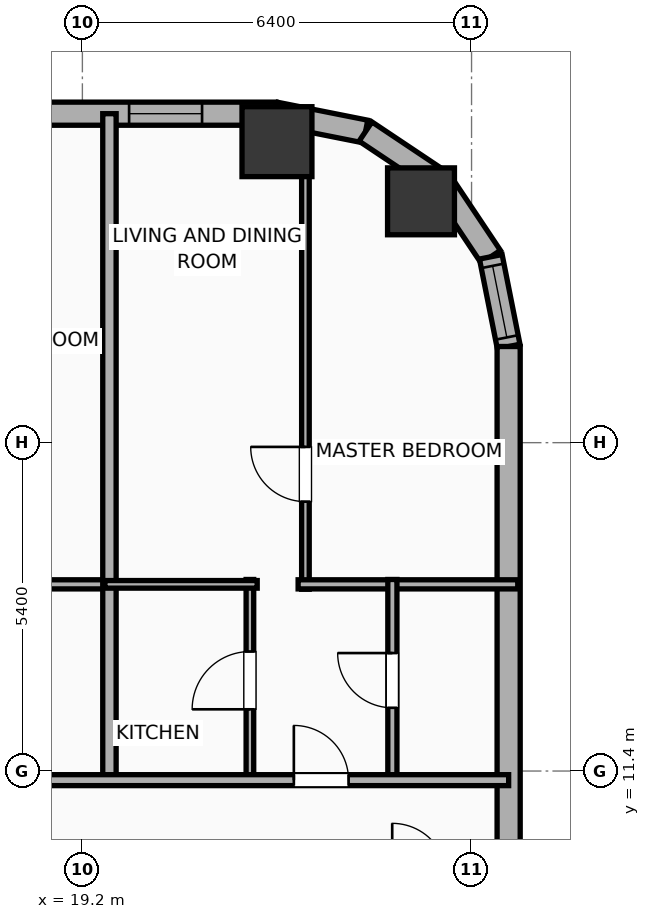
"""IFC4 building model, lengths in metres.
Left out: names, types, materials, properties, quantities, classifications, styles, units other than length and angle.
Written with IfcOpenShell. Run it as: python <this file> out.ifc"""

import sys

from ifc_helpers import new_model, si_unit, direction, frame, frame_2d, origin, origin_2d, place, context, subcontext, project, spatial, rectangle, hollow_rectangle, hollow_circle, extrude, element, fill, save


model = new_model("IFC4")
c1 = context("Model", 3, precision=1e-05, world=origin(), true_north=direction((0.0, 1.0)))
c2 = subcontext(c1, "Body", "Model", "MODEL_VIEW")
j1 = project(units=[si_unit("LENGTHUNIT", "METRE"), si_unit("PLANEANGLEUNIT", "RADIAN")], contexts=[c1])
p1 = place(None, origin())
s1 = spatial("IfcSite", under=j1, at=p1, CompositionType="ELEMENT")
p2 = place(p1, origin())
s2 = spatial("IfcBuilding", under=s1, at=p2, CompositionType="ELEMENT")
p3 = place(p2, frame((0.0, 0.0, 76.7)))
s3 = spatial("IfcBuildingStorey", under=s2, at=p3, CompositionType="ELEMENT", Elevation=76.7)
p4 = place(p3, frame((24.769, 20.769, 0.0), z_axis=(0.0, 0.0, 1.0), x_axis=(1.0, 0.0, 0.0)))
e1 = element("IfcColumn", 1, at=p4, inside=s3, PredefinedType="COLUMN", context=c2, shape_type="SweptSolid", body=[
    extrude(hollow_circle(Radius=0.55, WallThickness=0.036, at=origin_2d()), origin(), (0.0, 0.0, 1.0), 3.9),
])
p5 = place(p3, frame((22.4, 21.75, 0.0), z_axis=(0.0, 0.0, 1.0), x_axis=(1.0, 0.0, 0.0)))
e2 = element("IfcColumn", 2, at=p5, inside=s3, PredefinedType="COLUMN", context=c2, shape_type="SweptSolid", body=[
    extrude(hollow_rectangle(XDim=1.15, YDim=1.15, WallThickness=0.04, at=origin_2d()), origin(), (0.0, 0.0, 1.0), 3.9),
])
p6 = place(p3, frame((-29.581, 22.21, 0.0), z_axis=(0.0, 0.0, 1.0), x_axis=(1.0, 0.0, 0.0)))
e3 = element("IfcWall", 3, at=p6, inside=s3, PredefinedType="ELEMENTEDWALL", context=c2, shape_type="SweptSolid", body=[
    extrude(rectangle(XDim=51.963, YDim=0.38, at=frame_2d((25.981, 0.0))), origin(), (0.0, 0.0, 1.0), 3.6),
])
p7 = place(p6, frame((25.631, 0.0, 0.75)))
e4 = element("IfcOpeningElement", 4, at=p7, cuts=e3, PredefinedType="OPENING", context=c2, shape_type="SweptSolid", body=[
    extrude(rectangle(XDim=2.4, YDim=2.1, at=frame_2d((1.2, 1.05))), frame((0.0, 0.2, 0.0), z_axis=(0.0, -1.0, 0.0), x_axis=(1.0, 0.0, 0.0)), (0.0, 0.0, 1.0), 0.4),
])
p8 = place(p6, frame((42.952, 0.0, 0.75)))
e5 = element("IfcOpeningElement", 5, at=p8, cuts=e3, PredefinedType="OPENING", context=c2, shape_type="SweptSolid", body=[
    extrude(rectangle(XDim=2.4, YDim=2.1, at=frame_2d((1.2, 1.05))), frame((0.0, 0.2, 0.0), z_axis=(0.0, -1.0, 0.0), x_axis=(1.0, 0.0, 0.0)), (0.0, 0.0, 1.0), 0.4),
])
p9 = place(p6, frame((1.406, 0.0, 0.75)))
e6 = element("IfcOpeningElement", 6, at=p9, cuts=e3, PredefinedType="OPENING", context=c2, shape_type="SweptSolid", body=[
    extrude(rectangle(XDim=1.2, YDim=2.05, at=frame_2d((0.6, 1.025))), frame((0.0, 0.2, 0.0), z_axis=(0.0, -1.0, 0.0), x_axis=(1.0, 0.0, 0.0)), (0.0, 0.0, 1.0), 0.4),
])
p10 = place(p6, frame((4.297, 0.0, 0.75)))
e7 = element("IfcOpeningElement", 7, at=p10, cuts=e3, PredefinedType="OPENING", context=c2, shape_type="SweptSolid", body=[
    extrude(rectangle(XDim=1.2, YDim=2.05, at=frame_2d((0.6, 1.025))), frame((0.0, 0.2, 0.0), z_axis=(0.0, -1.0, 0.0), x_axis=(1.0, 0.0, 0.0)), (0.0, 0.0, 1.0), 0.4),
])
p11 = place(p6, frame((7.776, 0.0, 0.75)))
e8 = element("IfcOpeningElement", 8, at=p11, cuts=e3, PredefinedType="OPENING", context=c2, shape_type="SweptSolid", body=[
    extrude(rectangle(XDim=1.2, YDim=2.05, at=frame_2d((0.6, 1.025))), frame((0.0, 0.2, 0.0), z_axis=(0.0, -1.0, 0.0), x_axis=(1.0, 0.0, 0.0)), (0.0, 0.0, 1.0), 0.4),
])
p12 = place(p6, frame((14.036, 0.0, 0.75)))
e9 = element("IfcOpeningElement", 9, at=p12, cuts=e3, PredefinedType="OPENING", context=c2, shape_type="SweptSolid", body=[
    extrude(rectangle(XDim=1.2, YDim=2.05, at=frame_2d((0.6, 1.025))), frame((0.0, 0.2, 0.0), z_axis=(0.0, -1.0, 0.0), x_axis=(1.0, 0.0, 0.0)), (0.0, 0.0, 1.0), 0.4),
])
p13 = place(p6, frame((11.146, 0.0, 0.75)))
e10 = element("IfcOpeningElement", 10, at=p13, cuts=e3, PredefinedType="OPENING", context=c2, shape_type="SweptSolid", body=[
    extrude(rectangle(XDim=1.2, YDim=2.05, at=frame_2d((0.6, 1.025))), frame((0.0, 0.2, 0.0), z_axis=(0.0, -1.0, 0.0), x_axis=(1.0, 0.0, 0.0)), (0.0, 0.0, 1.0), 0.4),
])
p14 = place(p6, frame((18.751, 0.0, 0.75)))
e11 = element("IfcOpeningElement", 11, at=p14, cuts=e3, PredefinedType="OPENING", context=c2, shape_type="SweptSolid", body=[
    extrude(rectangle(XDim=1.2, YDim=2.05, at=frame_2d((0.6, 1.025))), frame((0.0, 0.2, 0.0), z_axis=(0.0, -1.0, 0.0), x_axis=(1.0, 0.0, 0.0)), (0.0, 0.0, 1.0), 0.4),
])
p15 = place(p6, frame((23.647, 0.0, 0.75)))
e12 = element("IfcOpeningElement", 12, at=p15, cuts=e3, PredefinedType="OPENING", context=c2, shape_type="SweptSolid", body=[
    extrude(rectangle(XDim=1.2, YDim=2.05, at=frame_2d((0.6, 1.025))), frame((0.0, 0.2, 0.0), z_axis=(0.0, -1.0, 0.0), x_axis=(1.0, 0.0, 0.0)), (0.0, 0.0, 1.0), 0.4),
])
p16 = place(p6, frame((32.006, 0.0, 0.75)))
e13 = element("IfcOpeningElement", 13, at=p16, cuts=e3, PredefinedType="OPENING", context=c2, shape_type="SweptSolid", body=[
    extrude(rectangle(XDim=1.2, YDim=2.05, at=frame_2d((0.6, 1.025))), frame((0.0, 0.2, 0.0), z_axis=(0.0, -1.0, 0.0), x_axis=(1.0, 0.0, 0.0)), (0.0, 0.0, 1.0), 0.4),
])
p17 = place(p6, frame((34.176, 0.0, 0.75)))
e14 = element("IfcOpeningElement", 14, at=p17, cuts=e3, PredefinedType="OPENING", context=c2, shape_type="SweptSolid", body=[
    extrude(rectangle(XDim=1.2, YDim=2.05, at=frame_2d((0.6, 1.025))), frame((0.0, 0.2, 0.0), z_axis=(0.0, -1.0, 0.0), x_axis=(1.0, 0.0, 0.0)), (0.0, 0.0, 1.0), 0.4),
])
p18 = place(p6, frame((37.063, 0.0, 0.75)))
e15 = element("IfcOpeningElement", 15, at=p18, cuts=e3, PredefinedType="OPENING", context=c2, shape_type="SweptSolid", body=[
    extrude(rectangle(XDim=1.2, YDim=2.05, at=frame_2d((0.6, 1.025))), frame((0.0, 0.2, 0.0), z_axis=(0.0, -1.0, 0.0), x_axis=(1.0, 0.0, 0.0)), (0.0, 0.0, 1.0), 0.4),
])
p19 = place(p6, frame((39.509, 0.0, 0.75)))
e16 = element("IfcOpeningElement", 16, at=p19, cuts=e3, PredefinedType="OPENING", context=c2, shape_type="SweptSolid", body=[
    extrude(rectangle(XDim=1.2, YDim=2.05, at=frame_2d((0.6, 1.025))), frame((0.0, 0.2, 0.0), z_axis=(0.0, -1.0, 0.0), x_axis=(1.0, 0.0, 0.0)), (0.0, 0.0, 1.0), 0.4),
])
p20 = place(p6, frame((46.921, 0.0, 0.75)))
e17 = element("IfcOpeningElement", 17, at=p20, cuts=e3, PredefinedType="OPENING", context=c2, shape_type="SweptSolid", body=[
    extrude(rectangle(XDim=1.2, YDim=2.05, at=frame_2d((0.6, 1.025))), frame((0.0, 0.2, 0.0), z_axis=(0.0, -1.0, 0.0), x_axis=(1.0, 0.0, 0.0)), (0.0, 0.0, 1.0), 0.4),
])
p21 = place(p6, frame((49.55, 0.0, 0.75)))
e18 = element("IfcOpeningElement", 18, at=p21, cuts=e3, PredefinedType="OPENING", context=c2, shape_type="SweptSolid", body=[
    extrude(rectangle(XDim=1.2, YDim=2.05, at=frame_2d((0.6, 1.025))), frame((0.0, 0.2, 0.0), z_axis=(0.0, -1.0, 0.0), x_axis=(1.0, 0.0, 0.0)), (0.0, 0.0, 1.0), 0.4),
])
p22 = place(p3, frame((22.381, 22.21, 0.0), z_axis=(0.0, 0.0, 1.0), x_axis=(0.980786132421, -0.195086038585, 0.0)))
e19 = element("IfcWall", 19, at=p22, inside=s3, PredefinedType="ELEMENTEDWALL", context=c2, shape_type="SweptSolid", body=[
    extrude(rectangle(XDim=1.504, YDim=0.38, at=frame_2d((0.752, 0.0))), origin(), (0.0, 0.0, 1.0), 3.6),
])
for number, where, z_axis, x_axis in (
    (20, (23.857, 21.917, 0.0), (0.0, 0.0, 1.0), (0.831, -0.556, 0.0)),
    (21, (25.091, 21.091, 0.0), (0.0, 0.0, 1.0), (0.556, -0.831, 0.0)),
):
    element("IfcWall", number, at=place(p3, frame(where, z_axis=z_axis, x_axis=x_axis)), inside=s3, PredefinedType="ELEMENTEDWALL", context=c2, shape_type="SweptSolid", body=[
        extrude(rectangle(XDim=1.485, YDim=0.38, at=frame_2d((0.743, 0.0))), origin(), (0.0, 0.0, 1.0), 3.6),
    ])
p23 = place(p3, frame((25.917, 19.857, 0.0), z_axis=(0.0, 0.0, 1.0), x_axis=(0.195086038585, -0.980786132421, 0.0)))
e22 = element("IfcWall", 22, at=p23, inside=s3, PredefinedType="ELEMENTEDWALL", context=c2, shape_type="SweptSolid", body=[
    extrude(rectangle(XDim=1.504, YDim=0.38, at=frame_2d((0.752, 0.0))), origin(), (0.0, 0.0, 1.0), 3.6),
])
p24 = place(p23, frame((0.152, 0.0, 0.75)))
e23 = element("IfcOpeningElement", 23, at=p24, cuts=e22, PredefinedType="OPENING", context=c2, shape_type="SweptSolid", body=[
    extrude(rectangle(XDim=1.2, YDim=2.05, at=frame_2d((0.6, 1.025))), frame((0.0, 0.2, 0.0), z_axis=(0.0, -1.0, 0.0), x_axis=(1.0, 0.0, 0.0)), (0.0, 0.0, 1.0), 0.4),
])
p25 = place(p3, frame((26.21, 18.381, 0.0), z_axis=(0.0, 0.0, 1.0), x_axis=(0.0, -1.0, 0.0)))
e24 = element("IfcWall", 24, at=p25, inside=s3, PredefinedType="ELEMENTEDWALL", context=c2, shape_type="SweptSolid", body=[
    extrude(rectangle(XDim=36.763, YDim=0.38, at=frame_2d((18.381, 0.0))), origin(), (0.0, 0.0, 1.0), 3.6),
])
p26 = place(p3, frame((16.115, 14.47, 0.0), z_axis=(0.0, 0.0, 1.0), x_axis=(1.0, 0.0, 0.0)))
e25 = element("IfcWall", 25, at=p26, inside=s3, PredefinedType="PLUMBINGWALL", context=c2, shape_type="SweptSolid", body=[
    extrude(rectangle(XDim=3.605, YDim=0.15, at=frame_2d((1.802, 0.0))), origin(), (0.0, 0.0, 1.0), 3.6),
])
p27 = place(p3, frame((19.645, 11.17, 0.0), z_axis=(0.0, 0.0, 1.0), x_axis=(0.0, 1.0, 0.0)))
e26 = element("IfcWall", 26, at=p27, inside=s3, PredefinedType="PARTITIONING", context=c2, shape_type="SweptSolid", body=[
    extrude(rectangle(XDim=11.04, YDim=0.22, at=frame_2d((5.52, 0.0))), origin(), (0.0, 0.0, 1.0), 3.6),
])
p28 = place(p3, frame((22.868, 14.39, 0.0), z_axis=(0.0, 0.0, 1.0), x_axis=(0.0, 1.0, 0.0)))
e27 = element("IfcWall", 27, at=p28, inside=s3, PredefinedType="PARTITIONING", context=c2, shape_type="SweptSolid", body=[
    extrude(rectangle(XDim=7.876, YDim=0.125, at=frame_2d((3.938, 0.0))), origin(), (0.0, 0.0, 1.0), 2.89),
])
p29 = place(p28, frame((1.44, 0.0, 0.0)))
e28 = element("IfcOpeningElement", 28, at=p29, cuts=e27, PredefinedType="OPENING", context=c2, shape_type="SweptSolid", body=[
    extrude(rectangle(XDim=0.9, YDim=2.05, at=frame_2d((0.45, 1.025))), frame((0.0, 0.073, 0.0), z_axis=(0.0, -1.0, 0.0), x_axis=(1.0, 0.0, 0.0)), (0.0, 0.0, 1.0), 0.145),
])
p30 = place(p3, frame((22.748, 14.47, 0.0), z_axis=(0.0, 0.0, 1.0), x_axis=(1.0, 0.0, 0.0)))
e29 = element("IfcWall", 29, at=p30, inside=s3, PredefinedType="PLUMBINGWALL", context=c2, shape_type="SweptSolid", body=[
    extrude(rectangle(XDim=3.612, YDim=0.15, at=frame_2d((1.806, 0.0))), origin(), (0.0, 0.0, 1.0), 3.6),
])
p31 = place(p3, frame((21.955, 11.23, 0.0), z_axis=(0.0, 0.0, 1.0), x_axis=(0.0, 1.0, 0.0)))
e30 = element("IfcWall", 30, at=p31, inside=s3, PredefinedType="PARTITIONING", context=c2, shape_type="SweptSolid", body=[
    extrude(rectangle(XDim=3.32, YDim=0.125, at=frame_2d((1.66, 0.0))), origin(), (0.0, 0.0, 1.0), 2.89),
])
p32 = place(p31, frame((1.185, 0.0, 0.0)))
e31 = element("IfcOpeningElement", 31, at=p32, cuts=e30, PredefinedType="OPENING", context=c2, shape_type="SweptSolid", body=[
    extrude(rectangle(XDim=0.95, YDim=2.05, at=frame_2d((0.475, 1.025))), frame((0.0, 0.073, 0.0), z_axis=(0.0, -1.0, 0.0), x_axis=(1.0, 0.0, 0.0)), (0.0, 0.0, 1.0), 0.145),
])
p33 = place(p3, frame((19.57, 14.47, 0.0), z_axis=(0.0, 0.0, 1.0), x_axis=(1.0, 0.0, 0.0)))
e32 = element("IfcWall", 32, at=p33, inside=s3, PredefinedType="PARTITIONING", context=c2, shape_type="SweptSolid", body=[
    extrude(rectangle(XDim=2.505, YDim=0.125, at=frame_2d((1.252, 0.0))), origin(), (0.0, 0.0, 1.0), 3.6),
])
p34 = place(p3, frame((24.298, 11.23, 0.0), z_axis=(0.0, 0.0, 1.0), x_axis=(0.0, 1.0, 0.0)))
e33 = element("IfcWall", 33, at=p34, inside=s3, PredefinedType="PLUMBINGWALL", context=c2, shape_type="SweptSolid", body=[
    extrude(rectangle(XDim=3.32, YDim=0.15, at=frame_2d((1.66, 0.0))), origin(), (0.0, 0.0, 1.0), 3.6),
])
p35 = place(p34, frame((1.21, 0.0, 0.0)))
e34 = element("IfcOpeningElement", 34, at=p35, cuts=e33, PredefinedType="OPENING", context=c2, shape_type="SweptSolid", body=[
    extrude(rectangle(XDim=0.9, YDim=2.05, at=frame_2d((0.45, 1.025))), frame((0.0, 0.085, 0.0), z_axis=(0.0, -1.0, 0.0), x_axis=(1.0, 0.0, 0.0)), (0.0, 0.0, 1.0), 0.17),
])
p36 = place(p3, frame((-33.41, 11.25, 0.0), z_axis=(0.0, 0.0, 1.0), x_axis=(1.0, 0.0, 0.0)))
e35 = element("IfcWall", 35, at=p36, inside=s3, PredefinedType="PARTITIONING", context=c2, shape_type="SweptSolid", body=[
    extrude(rectangle(XDim=59.62, YDim=0.18, at=frame_2d((29.81, 0.0))), origin(), (0.0, 0.0, 1.0), 3.6),
])
p37 = place(p36, frame((3.157, 0.0, 0.0)))
e36 = element("IfcOpeningElement", 36, at=p37, cuts=e35, PredefinedType="OPENING", context=c2, shape_type="SweptSolid", body=[
    extrude(rectangle(XDim=0.9, YDim=2.05, at=frame_2d((0.45, 1.025))), frame((0.0, 0.1, 0.0), z_axis=(0.0, -1.0, 0.0), x_axis=(1.0, 0.0, 0.0)), (0.0, 0.0, 1.0), 0.2),
])
p38 = place(p36, frame((10.145, 0.0, 0.0)))
e37 = element("IfcOpeningElement", 37, at=p38, cuts=e35, PredefinedType="OPENING", context=c2, shape_type="SweptSolid", body=[
    extrude(rectangle(XDim=0.9, YDim=2.05, at=frame_2d((0.45, 1.025))), frame((0.0, 0.1, 0.0), z_axis=(0.0, -1.0, 0.0), x_axis=(1.0, 0.0, 0.0)), (0.0, 0.0, 1.0), 0.2),
])
p39 = place(p36, frame((17.86, 0.0, 0.0)))
e38 = element("IfcOpeningElement", 38, at=p39, cuts=e35, PredefinedType="OPENING", context=c2, shape_type="SweptSolid", body=[
    extrude(rectangle(XDim=1.15, YDim=2.05, at=frame_2d((0.575, 1.025))), frame((0.0, 0.1, 0.0), z_axis=(0.0, -1.0, 0.0), x_axis=(1.0, 0.0, 0.0)), (0.0, 0.0, 1.0), 0.2),
])
p40 = place(p36, frame((23.338, 0.0, 0.0)))
e39 = element("IfcOpeningElement", 39, at=p40, cuts=e35, PredefinedType="OPENING", context=c2, shape_type="SweptSolid", body=[
    extrude(rectangle(XDim=0.9, YDim=2.05, at=frame_2d((0.45, 1.025))), frame((0.0, 0.1, 0.0), z_axis=(0.0, -1.0, 0.0), x_axis=(1.0, 0.0, 0.0)), (0.0, 0.0, 1.0), 0.2),
])
p41 = place(p36, frame((30.719, 0.0, 0.0)))
e40 = element("IfcOpeningElement", 40, at=p41, cuts=e35, PredefinedType="OPENING", context=c2, shape_type="SweptSolid", body=[
    extrude(rectangle(XDim=1.15, YDim=2.05, at=frame_2d((0.575, 1.025))), frame((0.0, 0.1, 0.0), z_axis=(0.0, -1.0, 0.0), x_axis=(1.0, 0.0, 0.0)), (0.0, 0.0, 1.0), 0.2),
])
p42 = place(p36, frame((34.81, 0.0, 0.0)))
e41 = element("IfcOpeningElement", 41, at=p42, cuts=e35, PredefinedType="OPENING", context=c2, shape_type="SweptSolid", body=[
    extrude(rectangle(XDim=1.15, YDim=2.05, at=frame_2d((0.575, 1.025))), frame((0.0, 0.1, 0.0), z_axis=(0.0, -1.0, 0.0), x_axis=(1.0, 0.0, 0.0)), (0.0, 0.0, 1.0), 0.2),
])
p43 = place(p36, frame((42.912, 0.0, 0.0)))
e42 = element("IfcOpeningElement", 42, at=p43, cuts=e35, PredefinedType="OPENING", context=c2, shape_type="SweptSolid", body=[
    extrude(rectangle(XDim=0.9, YDim=2.05, at=frame_2d((0.45, 1.025))), frame((0.0, 0.1, 0.0), z_axis=(0.0, -1.0, 0.0), x_axis=(1.0, 0.0, 0.0)), (0.0, 0.0, 1.0), 0.2),
])
p44 = place(p36, frame((49.482, 0.0, 0.0)))
e43 = element("IfcOpeningElement", 43, at=p44, cuts=e35, PredefinedType="OPENING", context=c2, shape_type="SweptSolid", body=[
    extrude(rectangle(XDim=0.9, YDim=2.05, at=frame_2d((0.45, 1.025))), frame((0.0, 0.1, 0.0), z_axis=(0.0, -1.0, 0.0), x_axis=(1.0, 0.0, 0.0)), (0.0, 0.0, 1.0), 0.2),
])
p45 = place(p36, frame((56.088, 0.0, 0.0)))
e44 = element("IfcOpeningElement", 44, at=p45, cuts=e35, PredefinedType="OPENING", context=c2, shape_type="SweptSolid", body=[
    extrude(rectangle(XDim=0.9, YDim=2.05, at=frame_2d((0.45, 1.025))), frame((0.0, 0.1, 0.0), z_axis=(0.0, -1.0, 0.0), x_axis=(1.0, 0.0, 0.0)), (0.0, 0.0, 1.0), 0.2),
])
p46 = place(p21, origin())
e45 = element("IfcWindow", 45, at=p46, inside=s3, PartitioningType="SINGLE_PANEL", PredefinedType="WINDOW", context=c2, shape_type="SweptSolid", body=[
    extrude(rectangle(XDim=1.2, YDim=2.05, at=frame_2d((0.6, 1.025))), frame((0.0, 0.03, 0.0), z_axis=(0.0, -1.0, 0.0), x_axis=(1.0, 0.0, 0.0)), (0.0, 0.0, 1.0), 0.06),
])
fill(e18, e45)
p47 = place(p24, origin())
e46 = element("IfcWindow", 46, at=p47, inside=s3, PartitioningType="SINGLE_PANEL", PredefinedType="WINDOW", context=c2, shape_type="SweptSolid", body=[
    extrude(rectangle(XDim=1.2, YDim=2.05, at=frame_2d((0.6, 1.025))), frame((0.0, 0.03, 0.0), z_axis=(0.0, -1.0, 0.0), x_axis=(1.0, 0.0, 0.0)), (0.0, 0.0, 1.0), 0.06),
])
fill(e23, e46)
p48 = place(p29, origin())
e47 = element("IfcDoor", 47, at=p48, inside=s3, OperationType="SINGLE_SWING_RIGHT", PredefinedType="DOOR", context=c2, shape_type="SweptSolid", body=[
    extrude(rectangle(XDim=0.9, YDim=2.05, at=frame_2d((0.45, 1.025))), frame((0.0, 0.025, 0.0), z_axis=(0.0, -1.0, 0.0), x_axis=(1.0, 0.0, 0.0)), (0.0, 0.0, 1.0), 0.05),
])
fill(e28, e47)
p49 = place(p32, origin())
e48 = element("IfcDoor", 48, at=p49, inside=s3, OperationType="SINGLE_SWING_LEFT", PredefinedType="DOOR", context=c2, shape_type="SweptSolid", body=[
    extrude(rectangle(XDim=0.95, YDim=2.05, at=frame_2d((0.475, 1.025))), frame((0.0, 0.025, 0.0), z_axis=(0.0, -1.0, 0.0), x_axis=(1.0, 0.0, 0.0)), (0.0, 0.0, 1.0), 0.05),
])
fill(e31, e48)
p50 = place(p35, origin())
e49 = element("IfcDoor", 49, at=p50, inside=s3, OperationType="SINGLE_SWING_RIGHT", PredefinedType="DOOR", context=c2, shape_type="SweptSolid", body=[
    extrude(rectangle(XDim=0.9, YDim=2.05, at=frame_2d((0.45, 1.025))), frame((0.0, 0.025, 0.0), z_axis=(0.0, -1.0, 0.0), x_axis=(1.0, 0.0, 0.0)), (0.0, 0.0, 1.0), 0.05),
])
fill(e34, e49)
p51 = place(p45, origin())
e50 = element("IfcDoor", 50, at=p51, inside=s3, OperationType="SINGLE_SWING_LEFT", PredefinedType="DOOR", context=c2, shape_type="SweptSolid", body=[
    extrude(rectangle(XDim=0.9, YDim=2.05, at=frame_2d((0.45, 1.025))), frame((0.0, 0.025, 0.0), z_axis=(0.0, -1.0, 0.0), x_axis=(1.0, 0.0, 0.0)), (0.0, 0.0, 1.0), 0.05),
])
fill(e44, e50)
save(model, sys.argv[1])
